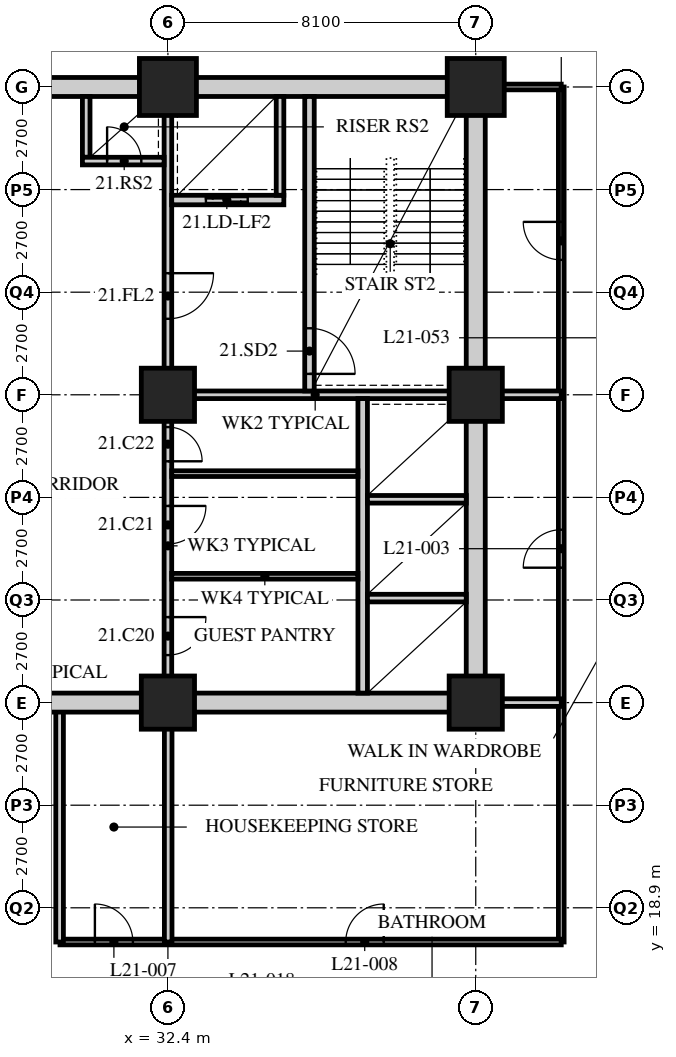
"""IFC4 building model, lengths in metres.
Left out: names, types, materials, properties, quantities, classifications, styles, units other than length and angle.
Written with IfcOpenShell. Run it as: python <this file> out.ifc"""

import sys

from ifc_helpers import new_model, si_unit, direction, frame, frame_2d, origin, origin_2d, place, context, subcontext, project, spatial, rectangle, hollow_rectangle, extrude, element, fill, save


model = new_model("IFC4")
c1 = context("Model", 3, precision=1e-05, world=origin(), true_north=direction((0.0, 1.0)))
c2 = subcontext(c1, "Body", "Model", "MODEL_VIEW")
j1 = project(units=[si_unit("LENGTHUNIT", "METRE"), si_unit("PLANEANGLEUNIT", "RADIAN")], contexts=[c1])
p1 = place(None, origin())
s1 = spatial("IfcSite", under=j1, at=p1, CompositionType="ELEMENT")
p2 = place(p1, origin())
s2 = spatial("IfcBuilding", under=s1, at=p2, CompositionType="ELEMENT")
p3 = place(p2, frame((0.0, 0.0, 84.0)))
s3 = spatial("IfcBuildingStorey", under=s2, at=p3, CompositionType="ELEMENT", Elevation=84.0)
for number, where, z_axis, x_axis in (
    (1, (32.4, 24.3, 0.0), (0.0, 0.0, 1.0), (1.0, 0.0, 0.0)),
    (2, (32.4, 32.4, 0.0), (0.0, 0.0, 1.0), (1.0, 0.0, 0.0)),
):
    element("IfcColumn", number, at=place(p3, frame(where, z_axis=z_axis, x_axis=x_axis)), inside=s3, PredefinedType="COLUMN", context=c2, shape_type="SweptSolid", body=[
        extrude(hollow_rectangle(XDim=1.4, YDim=1.4, WallThickness=0.12, at=origin_2d()), origin(), (0.0, 0.0, 1.0), 3.4),
    ])
p4 = place(p3, frame((32.4, 40.5, 0.0), z_axis=(0.0, 0.0, 1.0), x_axis=(1.0, 0.0, 0.0)))
e3 = element("IfcColumn", 3, at=p4, inside=s3, PredefinedType="COLUMN", context=c2, shape_type="SweptSolid", body=[
    extrude(hollow_rectangle(XDim=1.5, YDim=1.5, WallThickness=0.13, at=origin_2d()), origin(), (0.0, 0.0, 1.0), 3.4),
])
for number, where, z_axis, x_axis in (
    (4, (40.5, 24.3, 0.0), (0.0, 0.0, 1.0), (1.0, 0.0, 0.0)),
    (5, (40.5, 32.4, 0.0), (0.0, 0.0, 1.0), (1.0, 0.0, 0.0)),
):
    element("IfcColumn", number, at=place(p3, frame(where, z_axis=z_axis, x_axis=x_axis)), inside=s3, PredefinedType="COLUMN", context=c2, shape_type="SweptSolid", body=[
        extrude(hollow_rectangle(XDim=1.4, YDim=1.4, WallThickness=0.12, at=origin_2d()), origin(), (0.0, 0.0, 1.0), 3.4),
    ])
p5 = place(p3, frame((40.5, 40.5, 0.0), z_axis=(0.0, 0.0, 1.0), x_axis=(1.0, 0.0, 0.0)))
e6 = element("IfcColumn", 6, at=p5, inside=s3, PredefinedType="COLUMN", context=c2, shape_type="SweptSolid", body=[
    extrude(hollow_rectangle(XDim=1.5, YDim=1.5, WallThickness=0.13, at=origin_2d()), origin(), (0.0, 0.0, 1.0), 3.4),
])
p6 = place(p3, frame((42.75, 18.0, 0.0), z_axis=(0.0, 0.0, 1.0), x_axis=(0.0, 1.0, 0.0)))
e7 = element("IfcWall", 7, at=p6, inside=s3, PredefinedType="PARTITIONING", context=c2, shape_type="SweptSolid", body=[
    extrude(rectangle(XDim=22.5, YDim=0.15, at=frame_2d((11.25, 0.0))), origin(), (0.0, 0.0, 1.0), 3.19),
])
p7 = place(p6, frame((9.85, 0.0, 0.0)))
e8 = element("IfcOpeningElement", 8, at=p7, cuts=e7, PredefinedType="OPENING", context=c2, shape_type="SweptSolid", body=[
    extrude(rectangle(XDim=1.0, YDim=2.1, at=frame_2d((0.5, 1.05))), frame((0.0, 0.085, 0.0), z_axis=(0.0, -1.0, 0.0), x_axis=(1.0, 0.0, 0.0)), (0.0, 0.0, 1.0), 0.17),
])
p8 = place(p6, frame((17.95, 0.0, 0.0)))
e9 = element("IfcOpeningElement", 9, at=p8, cuts=e7, PredefinedType="OPENING", context=c2, shape_type="SweptSolid", body=[
    extrude(rectangle(XDim=1.0, YDim=2.1, at=frame_2d((0.5, 1.05))), frame((0.0, 0.085, 0.0), z_axis=(0.0, -1.0, 0.0), x_axis=(1.0, 0.0, 0.0)), (0.0, 0.0, 1.0), 0.17),
])
p9 = place(p3, frame((42.75, 40.5, 0.0), z_axis=(0.0, 0.0, 1.0), x_axis=(-1.0, 0.0, 0.0)))
e10 = element("IfcWall", 10, at=p9, inside=s3, PredefinedType="PARTITIONING", context=c2, shape_type="SweptSolid", body=[
    extrude(rectangle(XDim=2.05, YDim=0.15, at=frame_2d((1.025, 0.0))), origin(), (0.0, 0.0, 1.0), 2.428),
])
p10 = place(p3, frame((29.56, 18.0, 0.0), z_axis=(0.0, 0.0, 1.0), x_axis=(1.0, 0.0, 0.0)))
e11 = element("IfcWall", 11, at=p10, inside=s3, PredefinedType="PARTITIONING", context=c2, shape_type="SweptSolid", body=[
    extrude(rectangle(XDim=13.19, YDim=0.15, at=frame_2d((6.595, 0.0))), origin(), (0.0, 0.0, 1.0), 3.19),
])
p11 = place(p10, frame((0.919, 0.0, 0.0)))
e12 = element("IfcOpeningElement", 12, at=p11, cuts=e11, PredefinedType="OPENING", context=c2, shape_type="SweptSolid", body=[
    extrude(rectangle(XDim=1.0, YDim=2.1, at=frame_2d((0.5, 1.05))), frame((0.0, 0.085, 0.0), z_axis=(0.0, -1.0, 0.0), x_axis=(1.0, 0.0, 0.0)), (0.0, 0.0, 1.0), 0.17),
])
p12 = place(p10, frame((7.519, 0.0, 0.0)))
e13 = element("IfcOpeningElement", 13, at=p12, cuts=e11, PredefinedType="OPENING", context=c2, shape_type="SweptSolid", body=[
    extrude(rectangle(XDim=1.0, YDim=2.1, at=frame_2d((0.5, 1.05))), frame((0.0, 0.085, 0.0), z_axis=(0.0, -1.0, 0.0), x_axis=(1.0, 0.0, 0.0)), (0.0, 0.0, 1.0), 0.17),
])
p13 = place(p3, frame((40.5, 32.4, 0.0), z_axis=(0.0, 0.0, 1.0), x_axis=(1.0, 0.0, 0.0)))
e14 = element("IfcWall", 14, at=p13, inside=s3, PredefinedType="SOLIDWALL", context=c2, shape_type="SweptSolid", body=[
    extrude(rectangle(XDim=2.25, YDim=0.2, at=frame_2d((1.125, 0.0))), origin(), (0.0, 0.0, 1.0), 2.428),
])
p14 = place(p3, frame((32.407, 18.0, 0.0), z_axis=(0.0, 0.0, 1.0), x_axis=(0.0, 1.0, 0.0)))
e15 = element("IfcWall", 15, at=p14, inside=s3, PredefinedType="SOLIDWALL", context=c2, shape_type="SweptSolid", body=[
    extrude(rectangle(XDim=6.3, YDim=0.2, at=frame_2d((3.15, 0.0))), origin(), (0.0, 0.0, 1.0), 2.428),
])
p15 = place(p3, frame((29.55, 18.0, 0.0), z_axis=(0.0, 0.0, 1.0), x_axis=(0.0, 1.0, 0.0)))
e16 = element("IfcWall", 16, at=p15, inside=s3, PredefinedType="SOLIDWALL", context=c2, shape_type="SweptSolid", body=[
    extrude(rectangle(XDim=6.3, YDim=0.2, at=frame_2d((3.15, 0.0))), origin(), (0.0, 0.0, 1.0), 3.19),
])
p16 = place(p3, frame((40.5, 24.3, 0.0), z_axis=(0.0, 0.0, 1.0), x_axis=(1.0, 0.0, 0.0)))
e17 = element("IfcWall", 17, at=p16, inside=s3, PredefinedType="SOLIDWALL", context=c2, shape_type="SweptSolid", body=[
    extrude(rectangle(XDim=2.25, YDim=0.2, at=frame_2d((1.125, 0.0))), origin(), (0.0, 0.0, 1.0), 2.428),
])
p17 = place(p3, frame((15.95, 24.3, 0.0), z_axis=(0.0, 0.0, 1.0), x_axis=(1.0, 0.0, 0.0)))
e18 = element("IfcWall", 18, at=p17, inside=s3, PredefinedType="SOLIDWALL", context=c2, shape_type="SweptSolid", body=[
    extrude(rectangle(XDim=24.8, YDim=0.5, at=frame_2d((12.4, 0.0))), origin(), (0.0, 0.0, 1.0), 2.428),
])
p18 = place(p17, frame((11.5, 0.0, 0.0)))
e19 = element("IfcOpeningElement", 19, at=p18, cuts=e18, PredefinedType="OPENING", context=c2, shape_type="SweptSolid", body=[
    extrude(rectangle(XDim=1.8, YDim=2.4, at=frame_2d((0.9, 1.2))), frame((0.0, 0.26, 0.0), z_axis=(0.0, -1.0, 0.0), x_axis=(1.0, 0.0, 0.0)), (0.0, 0.0, 1.0), 0.52),
])
p19 = place(p3, frame((15.95, 40.5, 0.0), z_axis=(0.0, 0.0, 1.0), x_axis=(1.0, 0.0, 0.0)))
e20 = element("IfcWall", 20, at=p19, inside=s3, PredefinedType="SOLIDWALL", context=c2, shape_type="SweptSolid", body=[
    extrude(rectangle(XDim=24.8, YDim=0.5, at=frame_2d((12.4, 0.0))), origin(), (0.0, 0.0, 1.0), 2.428),
])
p20 = place(p19, frame((11.5, 0.0, 0.0)))
e21 = element("IfcOpeningElement", 21, at=p20, cuts=e20, PredefinedType="OPENING", context=c2, shape_type="SweptSolid", body=[
    extrude(rectangle(XDim=1.8, YDim=2.4, at=frame_2d((0.9, 1.2))), frame((0.0, 0.26, 0.0), z_axis=(0.0, -1.0, 0.0), x_axis=(1.0, 0.0, 0.0)), (0.0, 0.0, 1.0), 0.52),
])
p21 = place(p3, frame((40.5, 24.55, 0.0), z_axis=(0.0, 0.0, 1.0), x_axis=(0.0, 1.0, 0.0)))
e22 = element("IfcWall", 22, at=p21, inside=s3, PredefinedType="SOLIDWALL", context=c2, shape_type="SweptSolid", body=[
    extrude(rectangle(XDim=15.7, YDim=0.5, at=frame_2d((7.85, 0.0))), origin(), (0.0, 0.0, 1.0), 2.428),
])
p22 = place(p3, frame((32.3, 32.4, 0.0), z_axis=(0.0, 0.0, 1.0), x_axis=(1.0, 0.0, 0.0)))
e23 = element("IfcWall", 23, at=p22, inside=s3, PredefinedType="SOLIDWALL", context=c2, shape_type="SweptSolid", body=[
    extrude(rectangle(XDim=7.95, YDim=0.2, at=frame_2d((3.975, 0.0))), origin(), (0.0, 0.0, 1.0), 2.578),
])
p23 = place(p3, frame((32.4, 32.5, 0.0), z_axis=(0.0, 0.0, 1.0), x_axis=(0.0, 1.0, 0.0)))
e24 = element("IfcWall", 24, at=p23, inside=s3, PredefinedType="SOLIDWALL", context=c2, shape_type="SweptSolid", body=[
    extrude(rectangle(XDim=7.75, YDim=0.2, at=frame_2d((3.875, 0.0))), origin(), (0.0, 0.0, 1.0), 2.578),
])
p24 = place(p23, frame((1.9, 0.0, 0.0)))
e25 = element("IfcOpeningElement", 25, at=p24, cuts=e24, PredefinedType="OPENING", context=c2, shape_type="SweptSolid", body=[
    extrude(rectangle(XDim=1.2, YDim=2.1, at=frame_2d((0.6, 1.05))), frame((0.0, 0.11, 0.0), z_axis=(0.0, -1.0, 0.0), x_axis=(1.0, 0.0, 0.0)), (0.0, 0.0, 1.0), 0.22),
])
p25 = place(p3, frame((37.525, 24.55, 0.0), z_axis=(0.0, 0.0, 1.0), x_axis=(0.0, 1.0, 0.0)))
e26 = element("IfcWall", 26, at=p25, inside=s3, PredefinedType="SOLIDWALL", context=c2, shape_type="SweptSolid", body=[
    extrude(rectangle(XDim=7.75, YDim=0.25, at=frame_2d((3.875, 0.0))), origin(), (0.0, 0.0, 1.0), 3.19),
])
for number, where, z_axis, x_axis in (
    (27, (37.65, 27.05, 0.0), (0.0, 0.0, 1.0), (1.0, 0.0, 0.0)),
    (28, (37.65, 29.65, 0.0), (0.0, 0.0, 1.0), (1.0, 0.0, 0.0)),
):
    element("IfcWall", number, at=place(p3, frame(where, z_axis=z_axis, x_axis=x_axis)), inside=s3, PredefinedType="SOLIDWALL", context=c2, shape_type="SweptSolid", body=[
        extrude(rectangle(XDim=2.6, YDim=0.2, at=frame_2d((1.3, 0.0))), origin(), (0.0, 0.0, 1.0), 3.19),
    ])
p26 = place(p3, frame((36.125, 32.5, 0.0), z_axis=(0.0, 0.0, 1.0), x_axis=(0.0, 1.0, 0.0)))
e29 = element("IfcWall", 29, at=p26, inside=s3, PredefinedType="SOLIDWALL", context=c2, shape_type="SweptSolid", body=[
    extrude(rectangle(XDim=7.75, YDim=0.25, at=frame_2d((3.875, 0.0))), origin(), (0.0, 0.0, 1.0), 3.19),
])
p27 = place(p26, frame((0.45, 0.0, 0.0)))
e30 = element("IfcOpeningElement", 30, at=p27, cuts=e29, PredefinedType="OPENING", context=c2, shape_type="SweptSolid", body=[
    extrude(rectangle(XDim=1.2, YDim=2.1, at=frame_2d((0.6, 1.05))), frame((0.0, 0.135, 0.0), z_axis=(0.0, -1.0, 0.0), x_axis=(1.0, 0.0, 0.0)), (0.0, 0.0, 1.0), 0.27),
])
p28 = place(p3, frame((32.5, 37.525, 0.0), z_axis=(0.0, 0.0, 1.0), x_axis=(1.0, 0.0, 0.0)))
e31 = element("IfcWall", 31, at=p28, inside=s3, PredefinedType="SOLIDWALL", context=c2, shape_type="SweptSolid", body=[
    extrude(rectangle(XDim=2.95, YDim=0.25, at=frame_2d((1.475, 0.0))), origin(), (0.0, 0.0, 1.0), 3.19),
])
p29 = place(p28, frame((0.9, 0.0, 0.0)))
e32 = element("IfcOpeningElement", 32, at=p29, cuts=e31, PredefinedType="OPENING", context=c2, shape_type="SweptSolid", body=[
    extrude(rectangle(XDim=1.1, YDim=2.4, at=frame_2d((0.55, 1.2))), frame((0.0, 0.135, 0.0), z_axis=(0.0, -1.0, 0.0), x_axis=(1.0, 0.0, 0.0)), (0.0, 0.0, 1.0), 0.27),
])
p30 = place(p3, frame((35.35, 37.65, 0.0), z_axis=(0.0, 0.0, 1.0), x_axis=(0.0, 1.0, 0.0)))
e33 = element("IfcWall", 33, at=p30, inside=s3, PredefinedType="SOLIDWALL", context=c2, shape_type="SweptSolid", body=[
    extrude(rectangle(XDim=2.6, YDim=0.2, at=frame_2d((1.3, 0.0))), origin(), (0.0, 0.0, 1.0), 3.19),
])
p31 = place(p3, frame((30.25, 38.65, 0.0), z_axis=(0.0, 0.0, 1.0), x_axis=(0.0, 1.0, 0.0)))
e34 = element("IfcWall", 34, at=p31, inside=s3, PredefinedType="SOLIDWALL", context=c2, shape_type="SweptSolid", body=[
    extrude(rectangle(XDim=1.6, YDim=0.2, at=frame_2d((0.8, 0.0))), origin(), (0.0, 0.0, 1.0), 3.19),
])
p32 = place(p3, frame((30.15, 38.55, 0.0), z_axis=(0.0, 0.0, 1.0), x_axis=(1.0, 0.0, 0.0)))
e35 = element("IfcWall", 35, at=p32, inside=s3, PredefinedType="SOLIDWALL", context=c2, shape_type="SweptSolid", body=[
    extrude(rectangle(XDim=2.15, YDim=0.2, at=frame_2d((1.075, 0.0))), origin(), (0.0, 0.0, 1.0), 3.19),
])
p33 = place(p32, frame((0.65, 0.0, 0.0)))
e36 = element("IfcOpeningElement", 36, at=p33, cuts=e35, PredefinedType="OPENING", context=c2, shape_type="SweptSolid", body=[
    extrude(rectangle(XDim=0.9, YDim=2.1, at=frame_2d((0.45, 1.05))), frame((0.0, 0.11, 0.0), z_axis=(0.0, -1.0, 0.0), x_axis=(1.0, 0.0, 0.0)), (0.0, 0.0, 1.0), 0.22),
])
p34 = place(p3, frame((32.4, 24.55, 0.0), z_axis=(0.0, 0.0, 1.0), x_axis=(0.0, 1.0, 0.0)))
e37 = element("IfcWall", 37, at=p34, inside=s3, PredefinedType="PARTITIONING", context=c2, shape_type="SweptSolid", body=[
    extrude(rectangle(XDim=7.75, YDim=0.2, at=frame_2d((3.875, 0.0))), origin(), (0.0, 0.0, 1.0), 2.578),
])
p35 = place(p34, frame((1.0, 0.0, 0.0)))
e38 = element("IfcOpeningElement", 38, at=p35, cuts=e37, PredefinedType="OPENING", context=c2, shape_type="SweptSolid", body=[
    extrude(rectangle(XDim=1.0, YDim=2.1, at=frame_2d((0.5, 1.05))), frame((0.0, 0.11, 0.0), z_axis=(0.0, -1.0, 0.0), x_axis=(1.0, 0.0, 0.0)), (0.0, 0.0, 1.0), 0.22),
])
p36 = place(p34, frame((3.925, 0.0, 0.0)))
e39 = element("IfcOpeningElement", 39, at=p36, cuts=e37, PredefinedType="OPENING", context=c2, shape_type="SweptSolid", body=[
    extrude(rectangle(XDim=1.0, YDim=2.1, at=frame_2d((0.5, 1.05))), frame((0.0, 0.11, 0.0), z_axis=(0.0, -1.0, 0.0), x_axis=(1.0, 0.0, 0.0)), (0.0, 0.0, 1.0), 0.22),
])
p37 = place(p34, frame((6.1, 0.0, 0.0)))
e40 = element("IfcOpeningElement", 40, at=p37, cuts=e37, PredefinedType="OPENING", context=c2, shape_type="SweptSolid", body=[
    extrude(rectangle(XDim=0.9, YDim=2.1, at=frame_2d((0.45, 1.05))), frame((0.0, 0.11, 0.0), z_axis=(0.0, -1.0, 0.0), x_axis=(1.0, 0.0, 0.0)), (0.0, 0.0, 1.0), 0.22),
])
for number, where, z_axis, x_axis in (
    (41, (32.5, 27.625, 0.0), (0.0, 0.0, 1.0), (1.0, 0.0, 0.0)),
    (42, (32.5, 30.325, 0.0), (0.0, 0.0, 1.0), (1.0, 0.0, 0.0)),
):
    element("IfcWall", number, at=place(p3, frame(where, z_axis=z_axis, x_axis=x_axis)), inside=s3, PredefinedType="PARTITIONING", context=c2, shape_type="SweptSolid", body=[
        extrude(rectangle(XDim=4.9, YDim=0.15, at=frame_2d((2.45, 0.0))), origin(), (0.0, 0.0, 1.0), 3.19),
    ])
p38 = place(p7, origin())
e43 = element("IfcDoor", 43, at=p38, inside=s3, OperationType="SINGLE_SWING_LEFT", PredefinedType="DOOR", context=c2, shape_type="SweptSolid", body=[
    extrude(rectangle(XDim=1.0, YDim=2.1, at=frame_2d((0.5, 1.05))), frame((0.0, 0.025, 0.0), z_axis=(0.0, -1.0, 0.0), x_axis=(1.0, 0.0, 0.0)), (0.0, 0.0, 1.0), 0.05),
])
fill(e8, e43)
p39 = place(p8, origin())
e44 = element("IfcDoor", 44, at=p39, inside=s3, OperationType="SINGLE_SWING_RIGHT", PredefinedType="DOOR", context=c2, shape_type="SweptSolid", body=[
    extrude(rectangle(XDim=1.0, YDim=2.1, at=frame_2d((0.5, 1.05))), frame((0.0, 0.025, 0.0), z_axis=(0.0, -1.0, 0.0), x_axis=(1.0, 0.0, 0.0)), (0.0, 0.0, 1.0), 0.05),
])
fill(e9, e44)
p40 = place(p11, origin())
e45 = element("IfcDoor", 45, at=p40, inside=s3, OperationType="SINGLE_SWING_LEFT", PredefinedType="DOOR", context=c2, shape_type="SweptSolid", body=[
    extrude(rectangle(XDim=1.0, YDim=2.1, at=frame_2d((0.5, 1.05))), frame((0.0, 0.025, 0.0), z_axis=(0.0, -1.0, 0.0), x_axis=(1.0, 0.0, 0.0)), (0.0, 0.0, 1.0), 0.05),
])
fill(e12, e45)
p41 = place(p12, origin())
e46 = element("IfcDoor", 46, at=p41, inside=s3, OperationType="SINGLE_SWING_RIGHT", PredefinedType="DOOR", context=c2, shape_type="SweptSolid", body=[
    extrude(rectangle(XDim=1.0, YDim=2.1, at=frame_2d((0.5, 1.05))), frame((0.0, 0.025, 0.0), z_axis=(0.0, -1.0, 0.0), x_axis=(1.0, 0.0, 0.0)), (0.0, 0.0, 1.0), 0.05),
])
fill(e13, e46)
p42 = place(p35, origin())
e47 = element("IfcDoor", 47, at=p42, inside=s3, OperationType="SINGLE_SWING_LEFT", PredefinedType="DOOR", context=c2, shape_type="SweptSolid", body=[
    extrude(rectangle(XDim=1.0, YDim=2.1, at=frame_2d((0.5, 1.05))), frame((0.0, 0.025, 0.0), z_axis=(0.0, -1.0, 0.0), x_axis=(1.0, 0.0, 0.0)), (0.0, 0.0, 1.0), 0.05),
])
fill(e38, e47)
p43 = place(p36, origin())
e48 = element("IfcDoor", 48, at=p43, inside=s3, OperationType="SINGLE_SWING_LEFT", PredefinedType="DOOR", context=c2, shape_type="SweptSolid", body=[
    extrude(rectangle(XDim=1.0, YDim=2.1, at=frame_2d((0.5, 1.05))), frame((0.0, 0.025, 0.0), z_axis=(0.0, -1.0, 0.0), x_axis=(1.0, 0.0, 0.0)), (0.0, 0.0, 1.0), 0.05),
])
fill(e39, e48)
p44 = place(p37, origin())
e49 = element("IfcDoor", 49, at=p44, inside=s3, OperationType="SINGLE_SWING_RIGHT", PredefinedType="DOOR", context=c2, shape_type="SweptSolid", body=[
    extrude(rectangle(XDim=0.9, YDim=2.1, at=frame_2d((0.45, 1.05))), frame((0.0, 0.025, 0.0), z_axis=(0.0, -1.0, 0.0), x_axis=(1.0, 0.0, 0.0)), (0.0, 0.0, 1.0), 0.05),
])
fill(e40, e49)
p45 = place(p27, origin())
e50 = element("IfcDoor", 50, at=p45, inside=s3, OperationType="SINGLE_SWING_RIGHT", PredefinedType="DOOR", context=c2, shape_type="SweptSolid", body=[
    extrude(rectangle(XDim=1.2, YDim=2.1, at=frame_2d((0.6, 1.05))), frame((0.0, 0.025, 0.0), z_axis=(0.0, -1.0, 0.0), x_axis=(1.0, 0.0, 0.0)), (0.0, 0.0, 1.0), 0.05),
])
fill(e30, e50)
p46 = place(p24, origin())
e51 = element("IfcDoor", 51, at=p46, inside=s3, OperationType="SINGLE_SWING_LEFT", PredefinedType="DOOR", context=c2, shape_type="SweptSolid", body=[
    extrude(rectangle(XDim=1.2, YDim=2.1, at=frame_2d((0.6, 1.05))), frame((0.0, 0.025, 0.0), z_axis=(0.0, -1.0, 0.0), x_axis=(1.0, 0.0, 0.0)), (0.0, 0.0, 1.0), 0.05),
])
fill(e25, e51)
p47 = place(p33, origin())
e52 = element("IfcDoor", 52, at=p47, inside=s3, OperationType="SINGLE_SWING_LEFT", PredefinedType="DOOR", context=c2, shape_type="SweptSolid", body=[
    extrude(rectangle(XDim=0.9, YDim=2.1, at=frame_2d((0.45, 1.05))), frame((0.0, 0.025, 0.0), z_axis=(0.0, -1.0, 0.0), x_axis=(1.0, 0.0, 0.0)), (0.0, 0.0, 1.0), 0.05),
])
fill(e36, e52)
p48 = place(p29, origin())
e53 = element("IfcDoor", 53, at=p48, inside=s3, OperationType="DOUBLE_DOOR_SLIDING", PredefinedType="DOOR", context=c2, shape_type="SweptSolid", body=[
    extrude(rectangle(XDim=1.1, YDim=2.4, at=frame_2d((0.55, 1.2))), frame((0.0, 0.025, 0.0), z_axis=(0.0, -1.0, 0.0), x_axis=(1.0, 0.0, 0.0)), (0.0, 0.0, 1.0), 0.05),
])
fill(e32, e53)
save(model, sys.argv[1])
